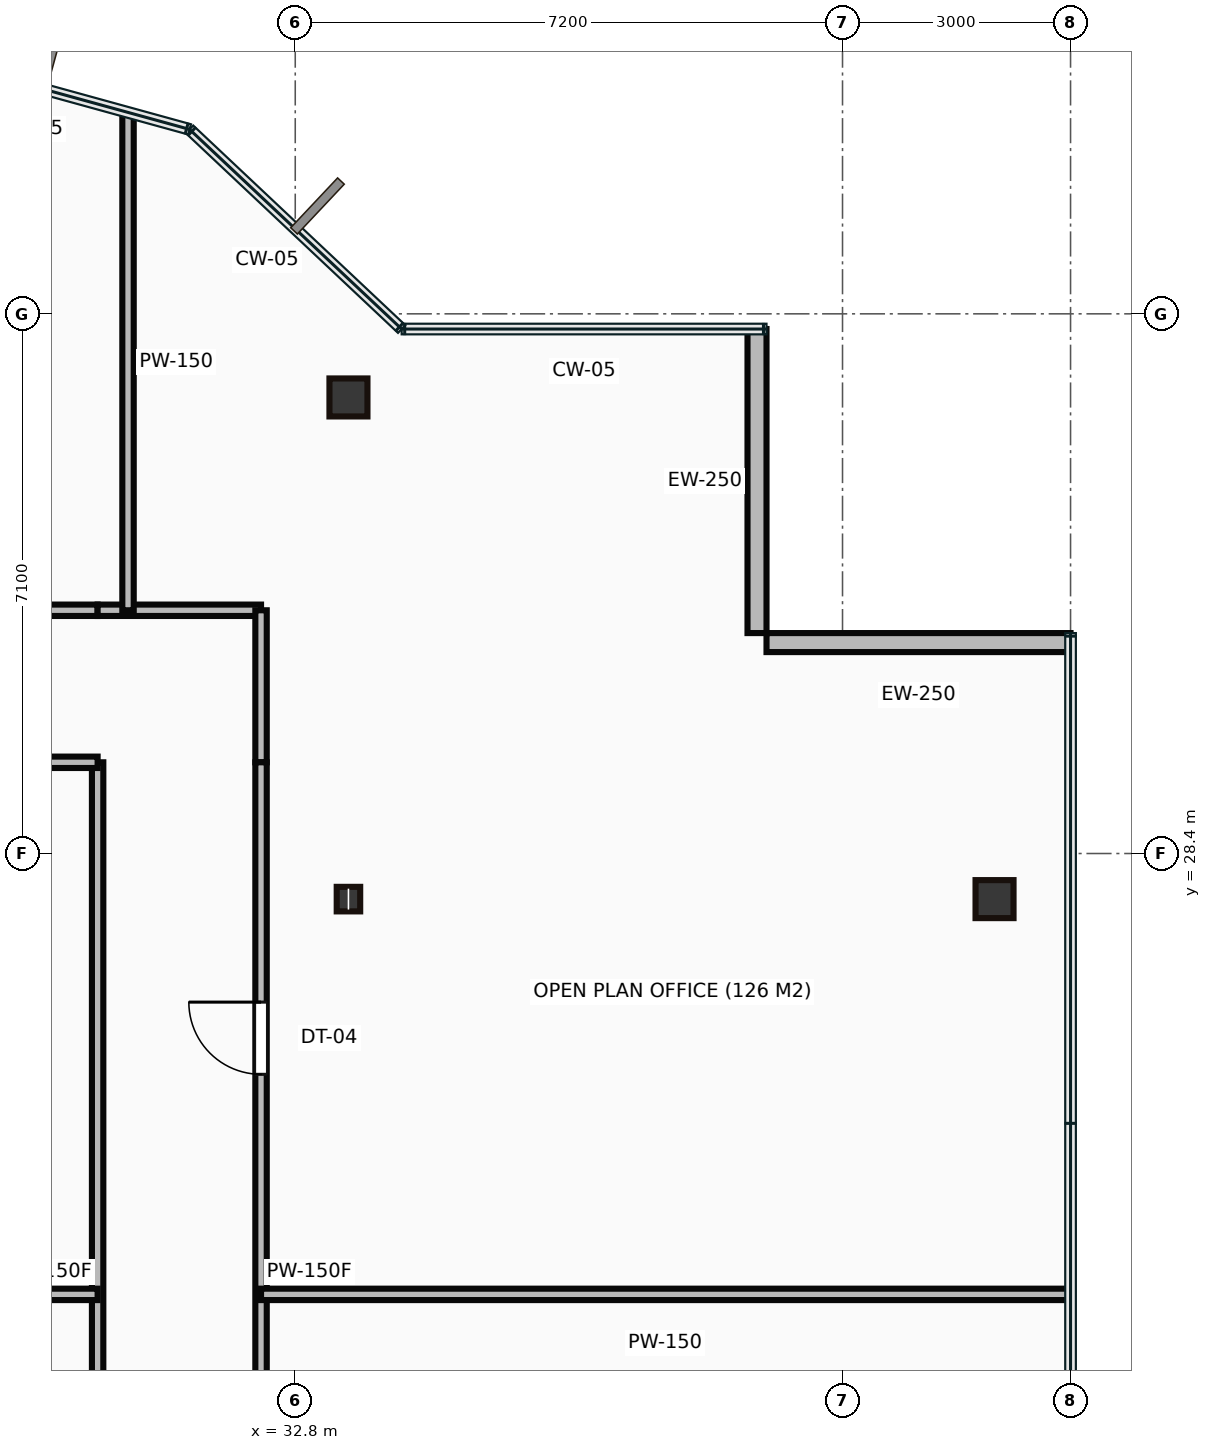
"""IFC4 building model, lengths in metres.
Left out: names, types, materials, properties, quantities, classifications, styles, units other than length and angle.
Written with IfcOpenShell. Run it as: python <this file> out.ifc"""

import sys

from ifc_helpers import new_model, si_unit, direction, frame, frame_2d, origin, origin_2d, place, context, subcontext, project, spatial, rectangle, hollow_rectangle, i_section, extrude, source, transform, mapped, element, fill, save


model = new_model("IFC4")
c1 = context("Model", 3, precision=1e-05, world=origin(), true_north=direction((0.0, 1.0)))
c2 = subcontext(c1, "Body", "Model", "MODEL_VIEW")
j1 = project(units=[si_unit("LENGTHUNIT", "METRE"), si_unit("PLANEANGLEUNIT", "RADIAN")], contexts=[c1])
p1 = place(None, origin())
s1 = spatial("IfcSite", under=j1, at=p1, CompositionType="ELEMENT")
p2 = place(p1, origin())
s2 = spatial("IfcBuilding", under=s1, at=p2, CompositionType="ELEMENT")
p3 = place(p2, frame((0.0, 0.0, 247.85)))
s3 = spatial("IfcBuildingStorey", under=s2, at=p3, CompositionType="ELEMENT", Elevation=247.85)
m1 = source(origin(), c2, "Body", "SweptSolid", [
    extrude(i_section(OverallWidth=0.309, OverallDepth=0.323, WebThickness=0.014, FlangeThickness=0.023, at=origin_2d()), origin(), (0.0, 0.0, 1.0), 3.65),
])
p4 = place(p3, frame((33.5, 27.8, 0.0), z_axis=(0.0, 0.0, 1.0), x_axis=(1.0, 0.0, 0.0)))
e1 = element("IfcColumn", 1, at=p4, inside=s3, PredefinedType="COLUMN", context=c2, shape_type="MappedRepresentation", body=[
    mapped(m1, transform((0.0, 0.0, 0.0))),
])
m2 = source(origin(), c2, "Body", "SweptSolid", [
    extrude(hollow_rectangle(XDim=0.5, YDim=0.5, WallThickness=0.022, at=origin_2d()), origin(), (0.0, 0.0, 1.0), 3.65),
])
for number, where, z_axis, x_axis in (
    (2, (33.5, 34.4, 0.0), (0.0, 0.0, 1.0), (1.0, 0.0, 0.0)),
    (3, (42.0, 27.8, 0.0), (0.0, 0.0, 1.0), (1.0, 0.0, 0.0)),
):
    element("IfcColumn", number, at=place(p3, frame(where, z_axis=z_axis, x_axis=x_axis)), inside=s3, PredefinedType="COLUMN", context=c2, shape_type="MappedRepresentation", body=[
        mapped(m2, transform((0.0, 0.0, 0.0))),
    ])
m3 = source(origin(), c2, "Body", "SweptSolid", [
    extrude(rectangle(XDim=4.0, YDim=0.25, at=frame_2d((2.0, 0.0))), origin(), (0.0, 0.0, 1.0), 3.4),
])
for number, where, z_axis, x_axis in (
    (4, (43.0, 31.175, 0.0), (0.0, 0.0, 1.0), (-1.0, 0.0, 0.0)),
    (5, (38.875, 31.3, 0.0), (0.0, 0.0, 1.0), (0.0, 1.0, 0.0)),
):
    element("IfcWall", number, at=place(p3, frame(where, z_axis=z_axis, x_axis=x_axis)), inside=s3, PredefinedType="STANDARD", context=c2, shape_type="MappedRepresentation", body=[
        mapped(m3, transform((0.0, 0.0, 0.0))),
    ])
m4 = source(origin(), c2, "Body", "SweptSolid", [
    extrude(rectangle(XDim=11.25, YDim=0.15, at=frame_2d((5.625, 0.0))), origin(), (0.0, 0.0, 1.0), 3.4),
])
p5 = place(p3, frame((18.95, 31.6, 0.0), z_axis=(0.0, 0.0, 1.0), x_axis=(1.0, 0.0, 0.0)))
e6 = element("IfcWall", 6, at=p5, inside=s3, PredefinedType="PARTITIONING", context=c2, shape_type="MappedRepresentation", body=[
    mapped(m4, transform((0.0, 0.0, 0.0))),
])
p6 = place(p5, frame((5.445, 0.0, 0.0)))
e7 = element("IfcOpeningElement", 7, at=p6, cuts=e6, PredefinedType="OPENING", context=c2, shape_type="SweptSolid", body=[
    extrude(rectangle(XDim=0.95, YDim=2.15, at=frame_2d((0.475, 1.075))), frame((0.0, 0.085, 0.0), z_axis=(0.0, -1.0, 0.0), x_axis=(1.0, 0.0, 0.0)), (0.0, 0.0, 1.0), 0.17),
])
m5 = source(origin(), c2, "Body", "SweptSolid", [
    extrude(rectangle(XDim=2.15, YDim=0.15, at=frame_2d((1.075, 0.0))), origin(), (0.0, 0.0, 1.0), 3.4),
])
p7 = place(p3, frame((30.2, 31.6, 0.0), z_axis=(0.0, 0.0, 1.0), x_axis=(1.0, 0.0, 0.0)))
e8 = element("IfcWall", 8, at=p7, inside=s3, PredefinedType="PARTITIONING", context=c2, shape_type="MappedRepresentation", body=[
    mapped(m5, transform((0.0, 0.0, 0.0))),
])
m6 = source(origin(), c2, "Body", "SweptSolid", [
    extrude(rectangle(XDim=2.0, YDim=0.15, at=frame_2d((1.0, 0.0))), origin(), (0.0, 0.0, 1.0), 3.4),
])
p8 = place(p3, frame((32.35, 31.6, 0.0), z_axis=(0.0, 0.0, 1.0), x_axis=(0.0, -1.0, 0.0)))
e9 = element("IfcWall", 9, at=p8, inside=s3, PredefinedType="PARTITIONING", context=c2, shape_type="MappedRepresentation", body=[
    mapped(m6, transform((0.0, 0.0, 0.0))),
])
m7 = source(origin(), c2, "Body", "SweptSolid", [
    extrude(rectangle(XDim=13.4, YDim=0.15, at=frame_2d((6.7, 0.0))), origin(), (0.0, 0.0, 1.0), 3.4),
])
p9 = place(p3, frame((32.35, 29.6, 0.0), z_axis=(0.0, 0.0, 1.0), x_axis=(0.0, -1.0, 0.0)))
e10 = element("IfcWall", 10, at=p9, inside=s3, PredefinedType="PARTITIONING", context=c2, shape_type="MappedRepresentation", body=[
    mapped(m7, transform((0.0, 0.0, 0.0))),
])
p10 = place(p9, frame((3.155, 0.0, 0.0)))
e11 = element("IfcOpeningElement", 11, at=p10, cuts=e10, PredefinedType="OPENING", context=c2, shape_type="SweptSolid", body=[
    extrude(rectangle(XDim=0.95, YDim=2.15, at=frame_2d((0.475, 1.075))), frame((0.0, 0.085, 0.0), z_axis=(0.0, -1.0, 0.0), x_axis=(1.0, 0.0, 0.0)), (0.0, 0.0, 1.0), 0.17),
])
p11 = place(p3, frame((30.2, 16.2, 0.0), z_axis=(0.0, 0.0, 1.0), x_axis=(0.0, 1.0, 0.0)))
e12 = element("IfcWall", 12, at=p11, inside=s3, PredefinedType="PARTITIONING", context=c2, shape_type="MappedRepresentation", body=[
    mapped(m7, transform((0.0, 0.0, 0.0))),
])
p12 = place(p3, frame((30.2, 29.6, 0.0), z_axis=(0.0, 0.0, 1.0), x_axis=(-1.0, 0.0, 0.0)))
e13 = element("IfcWall", 13, at=p12, inside=s3, PredefinedType="PARTITIONING", context=c2, shape_type="MappedRepresentation", body=[
    mapped(m4, transform((0.0, 0.0, 0.0))),
])
p13 = place(p12, frame((5.15, 0.0, 0.0)))
e14 = element("IfcOpeningElement", 14, at=p13, cuts=e13, PredefinedType="OPENING", context=c2, shape_type="SweptSolid", body=[
    extrude(rectangle(XDim=0.95, YDim=2.15, at=frame_2d((0.475, 1.075))), frame((0.0, 0.085, 0.0), z_axis=(0.0, -1.0, 0.0), x_axis=(1.0, 0.0, 0.0)), (0.0, 0.0, 1.0), 0.17),
])
m8 = source(origin(), c2, "Body", "SweptSolid", [
    extrude(rectangle(XDim=10.4, YDim=0.15, at=frame_2d((5.2, 0.0))), origin(), (0.0, 0.0, 1.0), 3.4),
])
p14 = place(p3, frame((19.8, 22.6, 0.0), z_axis=(0.0, 0.0, 1.0), x_axis=(1.0, 0.0, 0.0)))
e15 = element("IfcWall", 15, at=p14, inside=s3, PredefinedType="PARTITIONING", context=c2, shape_type="MappedRepresentation", body=[
    mapped(m8, transform((0.0, 0.0, 0.0))),
])
m9 = source(origin(), c2, "Body", "SweptSolid", [
    extrude(rectangle(XDim=6.529, YDim=0.15, at=frame_2d((3.265, 0.0))), origin(), (0.0, 0.0, 1.0), 3.4),
])
p15 = place(p3, frame((30.6, 38.129, 0.0), z_axis=(0.0, 0.0, 1.0), x_axis=(0.0, -1.0, 0.0)))
e16 = element("IfcWall", 16, at=p15, inside=s3, PredefinedType="PARTITIONING", context=c2, shape_type="MappedRepresentation", body=[
    mapped(m9, transform((0.0, 0.0, 0.0))),
])
m10 = source(origin(), c2, "Body", "SweptSolid", [
    extrude(rectangle(XDim=10.63, YDim=0.15, at=frame_2d((5.315, 0.0))), origin(), (0.0, 0.0, 1.0), 3.4),
])
p16 = place(p3, frame((42.98, 22.6, 0.0), z_axis=(0.0, 0.0, 1.0), x_axis=(-1.0, 0.0, 0.0)))
e17 = element("IfcWall", 17, at=p16, inside=s3, PredefinedType="PARTITIONING", context=c2, shape_type="MappedRepresentation", body=[
    mapped(m10, transform((0.0, 0.0, 0.0))),
])
m11 = source(origin(), c2, "Body", "SweptSolid", [
    extrude(rectangle(XDim=0.95, YDim=2.15, at=frame_2d((0.475, 1.075))), frame((0.0, 0.025, 0.0), z_axis=(0.0, -1.0, 0.0), x_axis=(1.0, 0.0, 0.0)), (0.0, 0.0, 1.0), 0.05),
])
p17 = place(p10, origin())
e18 = element("IfcDoor", 18, at=p17, inside=s3, OperationType="SINGLE_SWING_LEFT", PredefinedType="DOOR", context=c2, shape_type="MappedRepresentation", body=[
    mapped(m11, transform((0.0, 0.0, 0.0))),
])
fill(e11, e18)
save(model, sys.argv[1])
